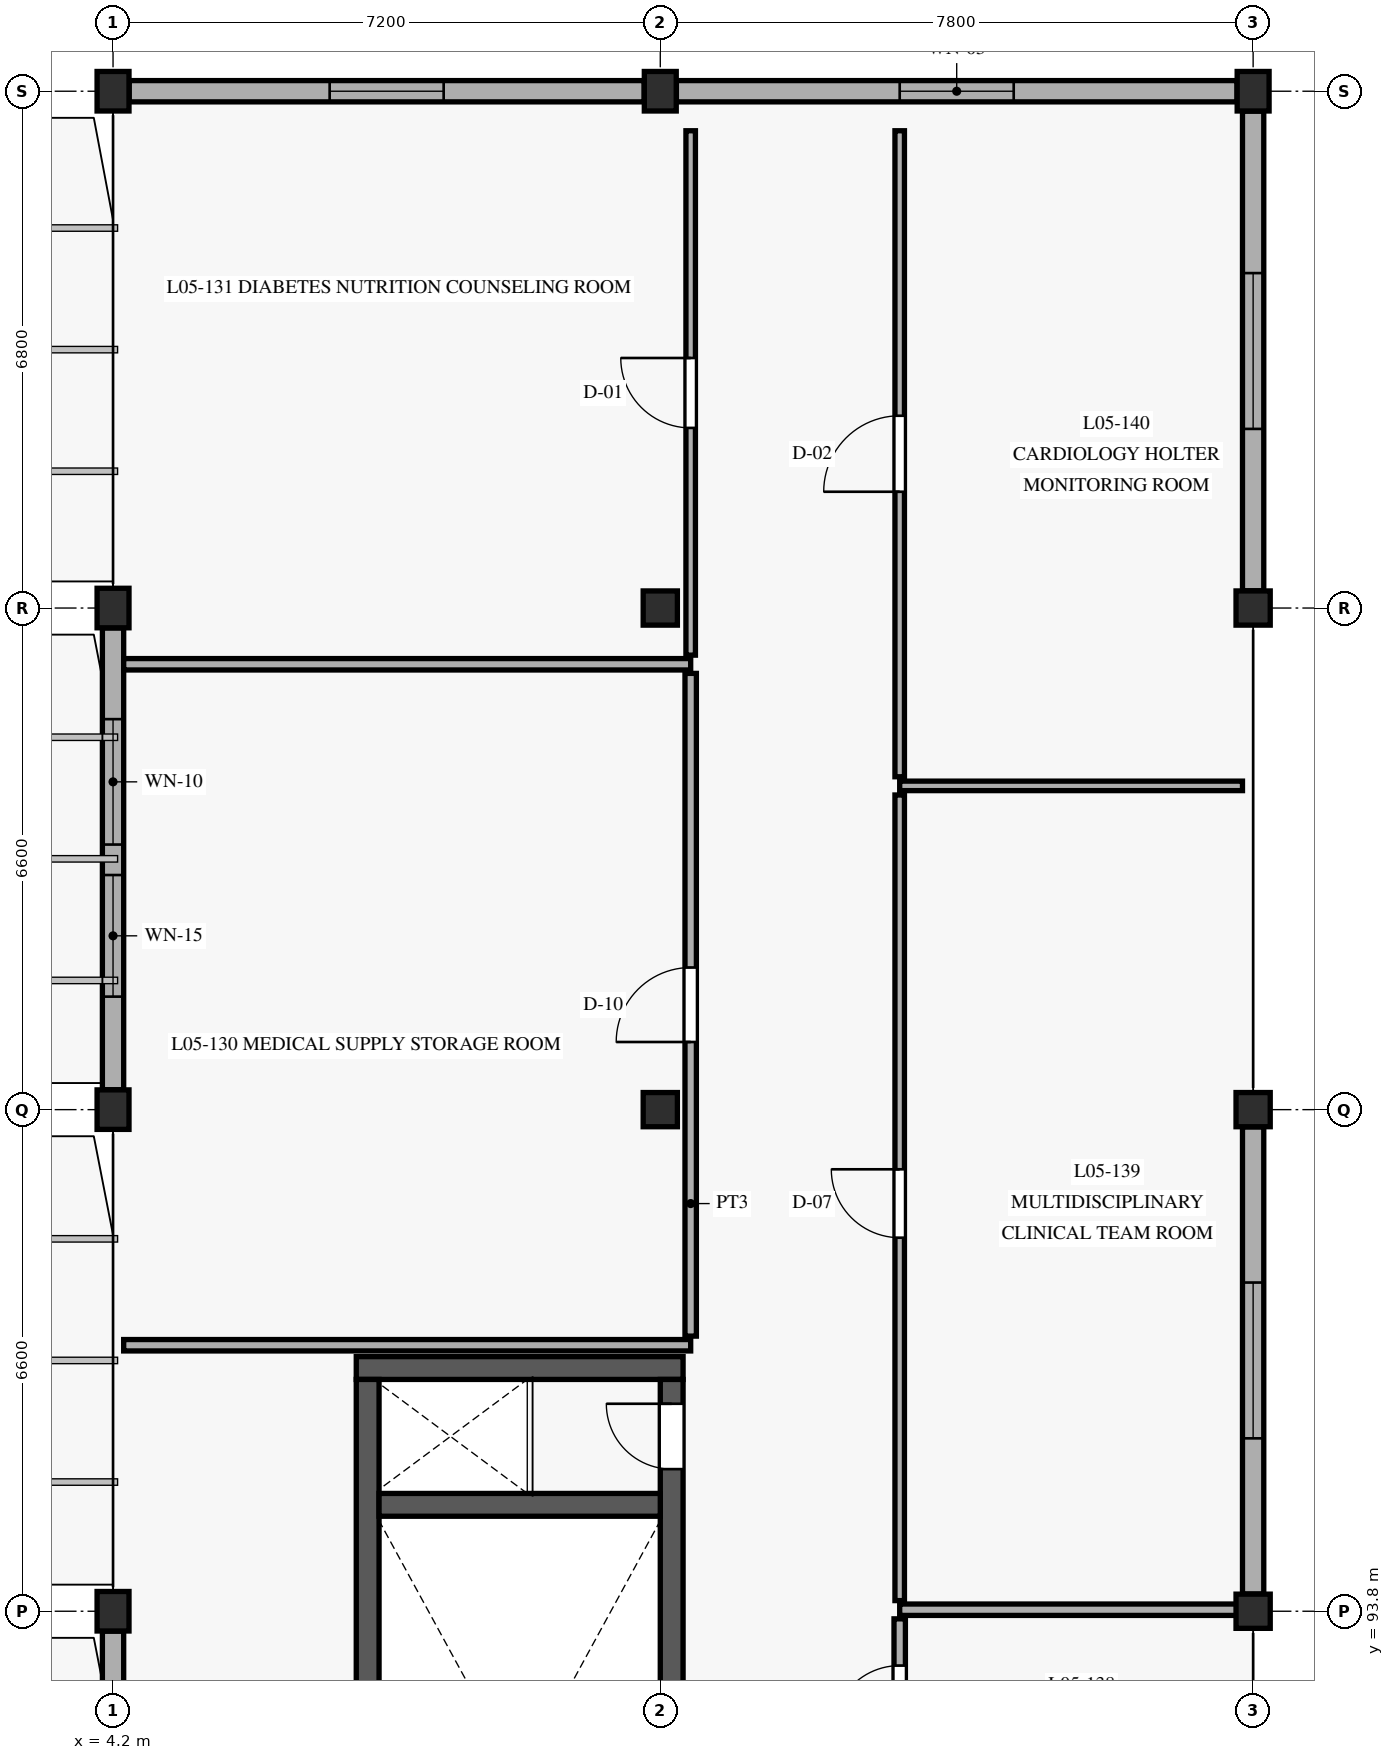
"""IFC4 building model, lengths in metres.
Left out: names, types, materials, properties, quantities, classifications, styles, units other than length and angle.
Written with IfcOpenShell. Run it as: python <this file> out.ifc"""

import sys

from ifc_helpers import new_model, si_unit, direction, frame, frame_2d, origin, origin_with_axes, origin_2d, place, context, subcontext, project, spatial, rectangle, extrude, element, fill, save


model = new_model("IFC4")
c1 = context("Model", 3, precision=1e-05, world=origin(), true_north=direction((0.0, 1.0)))
c2 = subcontext(c1, "Body", "Model", "MODEL_VIEW")
j1 = project(units=[si_unit("LENGTHUNIT", "METRE"), si_unit("PLANEANGLEUNIT", "RADIAN")], contexts=[c1])
p1 = place(None, origin())
s1 = spatial("IfcSite", under=j1, at=p1, CompositionType="ELEMENT")
p2 = place(p1, origin())
s2 = spatial("IfcBuilding", under=s1, at=p2, CompositionType="ELEMENT")
p3 = place(p2, frame((0.0, 0.0, 17.55)))
s3 = spatial("IfcBuildingStorey", under=s2, at=p3, CompositionType="ELEMENT", Elevation=17.55)
for number, where, z_axis, x_axis in (
    (1, (4.2, 93.8, 0.0), (0.0, 0.0, 1.0), (1.0, 0.0, 0.0)),
    (2, (4.2, 100.4, 0.0), (0.0, 0.0, 1.0), (1.0, 0.0, 0.0)),
    (3, (4.2, 107.0, 0.0), (0.0, 0.0, 1.0), (1.0, 0.0, 0.0)),
    (4, (4.2, 113.8, 0.0), (0.0, 0.0, 1.0), (1.0, 0.0, 0.0)),
):
    element("IfcColumn", number, at=place(p3, frame(where, z_axis=z_axis, x_axis=x_axis)), inside=s3, PredefinedType="COLUMN", context=c2, shape_type="SweptSolid", body=[
        extrude(rectangle(XDim=0.42, YDim=0.52, at=origin_2d()), origin(), (0.0, 0.0, 1.0), 4.05),
    ])
for number, where, z_axis, x_axis in (
    (5, (11.4, 100.4, 0.0), (0.0, 0.0, 1.0), (1.0, 0.0, 0.0)),
    (6, (11.4, 107.0, 0.0), (0.0, 0.0, 1.0), (1.0, 0.0, 0.0)),
):
    element("IfcColumn", number, at=place(p3, frame(where, z_axis=z_axis, x_axis=x_axis)), inside=s3, PredefinedType="COLUMN", context=c2, shape_type="SweptSolid", body=[
        extrude(rectangle(XDim=0.45, YDim=0.45, at=origin_2d()), origin(), (0.0, 0.0, 1.0), 4.05),
    ])
p4 = place(p3, frame((11.4, 113.8, 0.0), z_axis=(0.0, 0.0, 1.0), x_axis=(1.0, 0.0, 0.0)))
e7 = element("IfcColumn", 7, at=p4, inside=s3, PredefinedType="COLUMN", context=c2, shape_type="SweptSolid", body=[
    extrude(rectangle(XDim=0.42, YDim=0.52, at=origin_2d()), origin(), (0.0, 0.0, 1.0), 4.05),
])
for number, where, z_axis, x_axis in (
    (8, (19.2, 93.8, 0.0), (0.0, 0.0, 1.0), (1.0, 0.0, 0.0)),
    (9, (19.2, 100.4, 0.0), (0.0, 0.0, 1.0), (1.0, 0.0, 0.0)),
    (10, (19.2, 107.0, 0.0), (0.0, 0.0, 1.0), (1.0, 0.0, 0.0)),
):
    element("IfcColumn", number, at=place(p3, frame(where, z_axis=z_axis, x_axis=x_axis)), inside=s3, PredefinedType="COLUMN", context=c2, shape_type="SweptSolid", body=[
        extrude(rectangle(XDim=0.45, YDim=0.45, at=origin_2d()), origin(), (0.0, 0.0, 1.0), 4.05),
    ])
p5 = place(p3, frame((19.2, 113.8, 0.0), z_axis=(0.0, 0.0, 1.0), x_axis=(1.0, 0.0, 0.0)))
e11 = element("IfcColumn", 11, at=p5, inside=s3, PredefinedType="COLUMN", context=c2, shape_type="SweptSolid", body=[
    extrude(rectangle(XDim=0.42, YDim=0.52, at=origin_2d()), origin(), (0.0, 0.0, 1.0), 4.05),
])
p6 = place(p3, frame((11.7, 97.0, 0.0), z_axis=(0.0, 0.0, 1.0), x_axis=(-1.0, 0.0, 0.0)))
e12 = element("IfcWall", 12, at=p6, inside=s3, PredefinedType="SHEAR", context=c2, shape_type="SweptSolid", body=[
    extrude(rectangle(XDim=4.3, YDim=0.3, at=frame_2d((2.15, 0.0))), origin(), (0.0, 0.0, 1.0), 3.77),
])
p7 = place(p3, frame((7.55, 96.85, 0.0), z_axis=(0.0, 0.0, 1.0), x_axis=(0.0, -1.0, 0.0)))
e13 = element("IfcWall", 13, at=p7, inside=s3, PredefinedType="SHEAR", context=c2, shape_type="SweptSolid", body=[
    extrude(rectangle(XDim=8.7, YDim=0.3, at=frame_2d((4.35, 0.0))), origin(), (0.0, 0.0, 1.0), 3.77),
])
p8 = place(p3, frame((11.55, 88.15, 0.0), z_axis=(0.0, 0.0, 1.0), x_axis=(0.0, 1.0, 0.0)))
e14 = element("IfcWall", 14, at=p8, inside=s3, PredefinedType="SHEAR", context=c2, shape_type="SweptSolid", body=[
    extrude(rectangle(XDim=8.7, YDim=0.3, at=frame_2d((4.35, 0.0))), origin(), (0.0, 0.0, 1.0), 3.77),
])
p9 = place(p8, frame((0.2, 0.0, 0.0)))
e15 = element("IfcOpeningElement", 15, at=p9, cuts=e14, PredefinedType="OPENING", context=c2, shape_type="SweptSolid", body=[
    extrude(rectangle(XDim=1.1, YDim=2.2, at=frame_2d((0.55, 1.1))), frame((0.0, 0.16, 0.0), z_axis=(0.0, -1.0, 0.0), x_axis=(1.0, 0.0, 0.0)), (0.0, 0.0, 1.0), 0.32),
])
p10 = place(p8, frame((7.52, 0.0, 0.0)))
e16 = element("IfcOpeningElement", 16, at=p10, cuts=e14, PredefinedType="OPENING", context=c2, shape_type="SweptSolid", body=[
    extrude(rectangle(XDim=0.86, YDim=2.05, at=frame_2d((0.43, 1.025))), frame((0.0, 0.16, 0.0), z_axis=(0.0, -1.0, 0.0), x_axis=(1.0, 0.0, 0.0)), (0.0, 0.0, 1.0), 0.32),
])
p11 = place(p3, frame((7.7, 95.2, 0.0), z_axis=(0.0, 0.0, 1.0), x_axis=(1.0, 0.0, 0.0)))
e17 = element("IfcWall", 17, at=p11, inside=s3, PredefinedType="SHEAR", context=c2, shape_type="SweptSolid", body=[
    extrude(rectangle(XDim=3.7, YDim=0.3, at=frame_2d((1.85, 0.0))), origin(), (0.0, 0.0, 1.0), 3.77),
])
p12 = place(p3, frame((4.2, 93.538, 0.0), z_axis=(0.0, 0.0, 1.0), x_axis=(0.0, -1.0, 0.0)))
e18 = element("IfcWall", 18, at=p12, inside=s3, PredefinedType="SOLIDWALL", context=c2, shape_type="SweptSolid", body=[
    extrude(rectangle(XDim=6.076, YDim=0.28, at=frame_2d((3.038, 0.0))), origin(), (0.0, 0.0, 1.0), 3.35),
])
p13 = place(p12, frame((1.275, 0.0, 0.88)))
e19 = element("IfcOpeningElement", 19, at=p13, cuts=e18, PredefinedType="OPENING", context=c2, shape_type="SweptSolid", body=[
    extrude(rectangle(XDim=1.5, YDim=1.85, at=frame_2d((0.75, 0.925))), frame((0.0, 0.15, 0.0), z_axis=(0.0, -1.0, 0.0), x_axis=(1.0, 0.0, 0.0)), (0.0, 0.0, 1.0), 0.3),
])
p14 = place(p12, frame((3.351, 0.0, 0.88)))
e20 = element("IfcOpeningElement", 20, at=p14, cuts=e18, PredefinedType="OPENING", context=c2, shape_type="SweptSolid", body=[
    extrude(rectangle(XDim=1.4, YDim=2.05, at=frame_2d((0.7, 1.025))), frame((0.0, 0.15, 0.0), z_axis=(0.0, -1.0, 0.0), x_axis=(1.0, 0.0, 0.0)), (0.0, 0.0, 1.0), 0.3),
])
p15 = place(p3, frame((4.2, 106.738, 0.0), z_axis=(0.0, 0.0, 1.0), x_axis=(0.0, -1.0, 0.0)))
e21 = element("IfcWall", 21, at=p15, inside=s3, PredefinedType="SOLIDWALL", context=c2, shape_type="SweptSolid", body=[
    extrude(rectangle(XDim=6.076, YDim=0.28, at=frame_2d((3.038, 0.0))), origin(), (0.0, 0.0, 1.0), 3.35),
])
p16 = place(p15, frame((1.2, 0.0, 0.88)))
e22 = element("IfcOpeningElement", 22, at=p16, cuts=e21, PredefinedType="OPENING", context=c2, shape_type="SweptSolid", body=[
    extrude(rectangle(XDim=1.65, YDim=1.85, at=frame_2d((0.825, 0.925))), frame((0.0, 0.15, 0.0), z_axis=(0.0, -1.0, 0.0), x_axis=(1.0, 0.0, 0.0)), (0.0, 0.0, 1.0), 0.3),
])
p17 = place(p15, frame((3.251, 0.0, 0.88)))
e23 = element("IfcOpeningElement", 23, at=p17, cuts=e21, PredefinedType="OPENING", context=c2, shape_type="SweptSolid", body=[
    extrude(rectangle(XDim=1.6, YDim=2.05, at=frame_2d((0.8, 1.025))), frame((0.0, 0.15, 0.0), z_axis=(0.0, -1.0, 0.0), x_axis=(1.0, 0.0, 0.0)), (0.0, 0.0, 1.0), 0.3),
])
p18 = place(p3, frame((19.2, 94.027, 0.0), z_axis=(0.0, 0.0, 1.0), x_axis=(0.0, 1.0, 0.0)))
e24 = element("IfcWall", 24, at=p18, inside=s3, PredefinedType="SOLIDWALL", context=c2, shape_type="SweptSolid", body=[
    extrude(rectangle(XDim=6.146, YDim=0.28, at=frame_2d((3.073, 0.0))), origin(), (0.0, 0.0, 1.0), 3.39),
])
p19 = place(p18, frame((2.048, 0.0, 0.8)))
e25 = element("IfcOpeningElement", 25, at=p19, cuts=e24, PredefinedType="OPENING", context=c2, shape_type="SweptSolid", body=[
    extrude(rectangle(XDim=2.05, YDim=1.95, at=frame_2d((1.025, 0.975))), frame((0.0, 0.15, 0.0), z_axis=(0.0, -1.0, 0.0), x_axis=(1.0, 0.0, 0.0)), (0.0, 0.0, 1.0), 0.3),
])
p20 = place(p3, frame((19.2, 107.227, 0.0), z_axis=(0.0, 0.0, 1.0), x_axis=(0.0, 1.0, 0.0)))
e26 = element("IfcWall", 26, at=p20, inside=s3, PredefinedType="SOLIDWALL", context=c2, shape_type="SweptSolid", body=[
    extrude(rectangle(XDim=6.311, YDim=0.28, at=frame_2d((3.156, 0.0))), origin(), (0.0, 0.0, 1.0), 3.39),
])
p21 = place(p20, frame((2.13, 0.0, 0.8)))
e27 = element("IfcOpeningElement", 27, at=p21, cuts=e26, PredefinedType="OPENING", context=c2, shape_type="SweptSolid", body=[
    extrude(rectangle(XDim=2.05, YDim=1.95, at=frame_2d((1.025, 0.975))), frame((0.0, 0.15, 0.0), z_axis=(0.0, -1.0, 0.0), x_axis=(1.0, 0.0, 0.0)), (0.0, 0.0, 1.0), 0.3),
])
p22 = place(p3, frame((18.988, 113.8, 0.0), z_axis=(0.0, 0.0, 1.0), x_axis=(-1.0, 0.0, 0.0)))
e28 = element("IfcWall", 28, at=p22, inside=s3, PredefinedType="SOLIDWALL", context=c2, shape_type="SweptSolid", body=[
    extrude(rectangle(XDim=7.376, YDim=0.28, at=frame_2d((3.688, 0.0))), origin(), (0.0, 0.0, 1.0), 3.27),
])
p23 = place(p22, frame((2.938, 0.0, 0.85)))
e29 = element("IfcOpeningElement", 29, at=p23, cuts=e28, PredefinedType="OPENING", context=c2, shape_type="SweptSolid", body=[
    extrude(rectangle(XDim=1.5, YDim=2.2, at=frame_2d((0.75, 1.1))), frame((0.0, 0.15, 0.0), z_axis=(0.0, -1.0, 0.0), x_axis=(1.0, 0.0, 0.0)), (0.0, 0.0, 1.0), 0.3),
])
p24 = place(p3, frame((11.188, 113.8, 0.0), z_axis=(0.0, 0.0, 1.0), x_axis=(-1.0, 0.0, 0.0)))
e30 = element("IfcWall", 30, at=p24, inside=s3, PredefinedType="SOLIDWALL", context=c2, shape_type="SweptSolid", body=[
    extrude(rectangle(XDim=6.776, YDim=0.28, at=frame_2d((3.388, 0.0))), origin(), (0.0, 0.0, 1.0), 3.27),
])
p25 = place(p24, frame((2.638, 0.0, 0.85)))
e31 = element("IfcOpeningElement", 31, at=p25, cuts=e30, PredefinedType="OPENING", context=c2, shape_type="SweptSolid", body=[
    extrude(rectangle(XDim=1.5, YDim=2.2, at=frame_2d((0.75, 1.1))), frame((0.0, 0.15, 0.0), z_axis=(0.0, -1.0, 0.0), x_axis=(1.0, 0.0, 0.0)), (0.0, 0.0, 1.0), 0.3),
])
p26 = place(p3, frame((11.8, 97.42, 0.0), z_axis=(0.0, 0.0, 1.0), x_axis=(0.0, 1.0, 0.0)))
e32 = element("IfcWall", 32, at=p26, inside=s3, PredefinedType="PARTITIONING", context=c2, shape_type="SweptSolid", body=[
    extrude(rectangle(XDim=8.72, YDim=0.15, at=frame_2d((4.36, 0.0))), origin(), (0.0, 0.0, 1.0), 3.365),
])
p27 = place(p26, frame((3.87, 0.0, 0.0)))
e33 = element("IfcOpeningElement", 33, at=p27, cuts=e32, PredefinedType="OPENING", context=c2, shape_type="SweptSolid", body=[
    extrude(rectangle(XDim=0.98, YDim=2.12, at=frame_2d((0.49, 1.06))), frame((0.0, 0.085, 0.0), z_axis=(0.0, -1.0, 0.0), x_axis=(1.0, 0.0, 0.0)), (0.0, 0.0, 1.0), 0.17),
])
for number, where, z_axis, x_axis in (
    (34, (4.34, 106.26, 0.0), (0.0, 0.0, 1.0), (1.0, 0.0, 0.0)),
    (35, (4.34, 97.3, 0.0), (0.0, 0.0, 1.0), (1.0, 0.0, 0.0)),
):
    element("IfcWall", number, at=place(p3, frame(where, z_axis=z_axis, x_axis=x_axis)), inside=s3, PredefinedType="PARTITIONING", context=c2, shape_type="SweptSolid", body=[
        extrude(rectangle(XDim=7.46, YDim=0.15, at=frame_2d((3.73, 0.0))), origin(), (0.0, 0.0, 1.0), 3.345),
    ])
p28 = place(p3, frame((11.8, 106.38, 0.0), z_axis=(0.0, 0.0, 1.0), x_axis=(0.0, 1.0, 0.0)))
e36 = element("IfcWall", 36, at=p28, inside=s3, PredefinedType="PARTITIONING", context=c2, shape_type="SweptSolid", body=[
    extrude(rectangle(XDim=6.9, YDim=0.125, at=frame_2d((3.45, 0.0))), origin(), (0.0, 0.0, 1.0), 3.365),
])
p29 = place(p28, frame((2.99, 0.0, 0.0)))
e37 = element("IfcOpeningElement", 37, at=p29, cuts=e36, PredefinedType="OPENING", context=c2, shape_type="SweptSolid", body=[
    extrude(rectangle(XDim=0.92, YDim=2.15, at=frame_2d((0.46, 1.075))), frame((0.0, 0.073, 0.0), z_axis=(0.0, -1.0, 0.0), x_axis=(1.0, 0.0, 0.0)), (0.0, 0.0, 1.0), 0.145),
])
p30 = place(p3, frame((14.55, 91.59, 0.0), z_axis=(0.0, 0.0, 1.0), x_axis=(0.0, 1.0, 0.0)))
e38 = element("IfcWall", 38, at=p30, inside=s3, PredefinedType="PARTITIONING", context=c2, shape_type="SweptSolid", body=[
    extrude(rectangle(XDim=2.11, YDim=0.15, at=frame_2d((1.055, 0.0))), origin(), (0.0, 0.0, 1.0), 3.365),
])
p31 = place(p30, frame((0.615, 0.0, 0.0)))
e39 = element("IfcOpeningElement", 39, at=p31, cuts=e38, PredefinedType="OPENING", context=c2, shape_type="SweptSolid", body=[
    extrude(rectangle(XDim=0.88, YDim=2.1, at=frame_2d((0.44, 1.05))), frame((0.0, 0.085, 0.0), z_axis=(0.0, -1.0, 0.0), x_axis=(1.0, 0.0, 0.0)), (0.0, 0.0, 1.0), 0.17),
])
p32 = place(p3, frame((14.55, 93.82, 0.0), z_axis=(0.0, 0.0, 1.0), x_axis=(1.0, 0.0, 0.0)))
e40 = element("IfcWall", 40, at=p32, inside=s3, PredefinedType="PARTITIONING", context=c2, shape_type="SweptSolid", body=[
    extrude(rectangle(XDim=4.51, YDim=0.15, at=frame_2d((2.255, 0.0))), origin(), (0.0, 0.0, 1.0), 3.365),
])
p33 = place(p3, frame((14.55, 93.94, 0.0), z_axis=(0.0, 0.0, 1.0), x_axis=(0.0, 1.0, 0.0)))
e41 = element("IfcWall", 41, at=p33, inside=s3, PredefinedType="PARTITIONING", context=c2, shape_type="SweptSolid", body=[
    extrude(rectangle(XDim=10.6, YDim=0.125, at=frame_2d((5.3, 0.0))), origin(), (0.0, 0.0, 1.0), 3.365),
])
p34 = place(p33, frame((4.775, 0.0, 0.0)))
e42 = element("IfcOpeningElement", 42, at=p34, cuts=e41, PredefinedType="OPENING", context=c2, shape_type="SweptSolid", body=[
    extrude(rectangle(XDim=0.9, YDim=2.12, at=frame_2d((0.45, 1.06))), frame((0.0, 0.073, 0.0), z_axis=(0.0, -1.0, 0.0), x_axis=(1.0, 0.0, 0.0)), (0.0, 0.0, 1.0), 0.145),
])
p35 = place(p3, frame((14.55, 104.66, 0.0), z_axis=(0.0, 0.0, 1.0), x_axis=(1.0, 0.0, 0.0)))
e43 = element("IfcWall", 43, at=p35, inside=s3, PredefinedType="PARTITIONING", context=c2, shape_type="SweptSolid", body=[
    extrude(rectangle(XDim=4.51, YDim=0.125, at=frame_2d((2.255, 0.0))), origin(), (0.0, 0.0, 1.0), 3.385),
])
p36 = place(p3, frame((14.55, 104.78, 0.0), z_axis=(0.0, 0.0, 1.0), x_axis=(0.0, 1.0, 0.0)))
e44 = element("IfcWall", 44, at=p36, inside=s3, PredefinedType="PARTITIONING", context=c2, shape_type="SweptSolid", body=[
    extrude(rectangle(XDim=8.5, YDim=0.125, at=frame_2d((4.25, 0.0))), origin(), (0.0, 0.0, 1.0), 3.365),
])
p37 = place(p36, frame((3.75, 0.0, 0.0)))
e45 = element("IfcOpeningElement", 45, at=p37, cuts=e44, PredefinedType="OPENING", context=c2, shape_type="SweptSolid", body=[
    extrude(rectangle(XDim=1.0, YDim=2.15, at=frame_2d((0.5, 1.075))), frame((0.0, 0.073, 0.0), z_axis=(0.0, -1.0, 0.0), x_axis=(1.0, 0.0, 0.0)), (0.0, 0.0, 1.0), 0.145),
])
p38 = place(p10, origin_with_axes())
e46 = element("IfcDoor", 46, at=p38, inside=s3, OperationType="SINGLE_SWING_RIGHT", PredefinedType="DOOR", context=c2, shape_type="SweptSolid", body=[
    extrude(rectangle(XDim=0.86, YDim=2.05, at=frame_2d((0.43, 1.025))), frame((0.0, 0.025, 0.0), z_axis=(0.0, -1.0, 0.0), x_axis=(1.0, 0.0, 0.0)), (0.0, 0.0, 1.0), 0.05),
])
fill(e16, e46)
p39 = place(p16, origin_with_axes())
e47 = element("IfcWindow", 47, at=p39, inside=s3, PartitioningType="SINGLE_PANEL", PredefinedType="WINDOW", context=c2, shape_type="SweptSolid", body=[
    extrude(rectangle(XDim=1.65, YDim=1.85, at=frame_2d((0.825, 0.925))), frame((0.0, 0.03, 0.0), z_axis=(0.0, -1.0, 0.0), x_axis=(1.0, 0.0, 0.0)), (0.0, 0.0, 1.0), 0.06),
])
fill(e22, e47)
p40 = place(p17, origin_with_axes())
e48 = element("IfcWindow", 48, at=p40, inside=s3, PartitioningType="SINGLE_PANEL", PredefinedType="WINDOW", context=c2, shape_type="SweptSolid", body=[
    extrude(rectangle(XDim=1.6, YDim=2.05, at=frame_2d((0.8, 1.025))), frame((0.0, 0.03, 0.0), z_axis=(0.0, -1.0, 0.0), x_axis=(1.0, 0.0, 0.0)), (0.0, 0.0, 1.0), 0.06),
])
fill(e23, e48)
p41 = place(p19, origin_with_axes())
e49 = element("IfcWindow", 49, at=p41, inside=s3, PartitioningType="SINGLE_PANEL", PredefinedType="WINDOW", context=c2, shape_type="SweptSolid", body=[
    extrude(rectangle(XDim=2.05, YDim=1.95, at=frame_2d((1.025, 0.975))), frame((0.0, 0.03, 0.0), z_axis=(0.0, -1.0, 0.0), x_axis=(1.0, 0.0, 0.0)), (0.0, 0.0, 1.0), 0.06),
])
fill(e25, e49)
p42 = place(p21, origin_with_axes())
e50 = element("IfcWindow", 50, at=p42, inside=s3, PartitioningType="SINGLE_PANEL", PredefinedType="WINDOW", context=c2, shape_type="SweptSolid", body=[
    extrude(rectangle(XDim=2.05, YDim=1.95, at=frame_2d((1.025, 0.975))), frame((0.0, 0.03, 0.0), z_axis=(0.0, -1.0, 0.0), x_axis=(1.0, 0.0, 0.0)), (0.0, 0.0, 1.0), 0.06),
])
fill(e27, e50)
p43 = place(p23, origin_with_axes())
e51 = element("IfcWindow", 51, at=p43, inside=s3, PartitioningType="SINGLE_PANEL", PredefinedType="WINDOW", context=c2, shape_type="SweptSolid", body=[
    extrude(rectangle(XDim=1.5, YDim=2.2, at=frame_2d((0.75, 1.1))), frame((0.0, 0.03, 0.0), z_axis=(0.0, -1.0, 0.0), x_axis=(1.0, 0.0, 0.0)), (0.0, 0.0, 1.0), 0.06),
])
fill(e29, e51)
p44 = place(p25, origin_with_axes())
e52 = element("IfcWindow", 52, at=p44, inside=s3, PartitioningType="SINGLE_PANEL", PredefinedType="WINDOW", context=c2, shape_type="SweptSolid", body=[
    extrude(rectangle(XDim=1.5, YDim=2.2, at=frame_2d((0.75, 1.1))), frame((0.0, 0.03, 0.0), z_axis=(0.0, -1.0, 0.0), x_axis=(1.0, 0.0, 0.0)), (0.0, 0.0, 1.0), 0.06),
])
fill(e31, e52)
p45 = place(p27, origin_with_axes())
e53 = element("IfcDoor", 53, at=p45, inside=s3, OperationType="SINGLE_SWING_LEFT", PredefinedType="DOOR", context=c2, shape_type="SweptSolid", body=[
    extrude(rectangle(XDim=0.98, YDim=2.12, at=frame_2d((0.49, 1.06))), frame((0.0, 0.025, 0.0), z_axis=(0.0, -1.0, 0.0), x_axis=(1.0, 0.0, 0.0)), (0.0, 0.0, 1.0), 0.05),
])
fill(e33, e53)
p46 = place(p29, origin_with_axes())
e54 = element("IfcDoor", 54, at=p46, inside=s3, OperationType="SINGLE_SWING_RIGHT", PredefinedType="DOOR", context=c2, shape_type="SweptSolid", body=[
    extrude(rectangle(XDim=0.92, YDim=2.15, at=frame_2d((0.46, 1.075))), frame((0.0, 0.025, 0.0), z_axis=(0.0, -1.0, 0.0), x_axis=(1.0, 0.0, 0.0)), (0.0, 0.0, 1.0), 0.05),
])
fill(e37, e54)
p47 = place(p31, frame((0.88, 0.0, 0.0), z_axis=(0.0, 0.0, 1.0), x_axis=(-1.0, 0.0, 0.0)))
e55 = element("IfcDoor", 55, at=p47, inside=s3, OperationType="SINGLE_SWING_RIGHT", PredefinedType="DOOR", context=c2, shape_type="SweptSolid", body=[
    extrude(rectangle(XDim=0.88, YDim=2.1, at=frame_2d((0.44, 1.05))), frame((0.0, 0.025, 0.0), z_axis=(0.0, -1.0, 0.0), x_axis=(1.0, 0.0, 0.0)), (0.0, 0.0, 1.0), 0.05),
])
fill(e39, e55)
p48 = place(p34, frame((0.9, 0.0, 0.0), z_axis=(0.0, 0.0, 1.0), x_axis=(-1.0, 0.0, 0.0)))
e56 = element("IfcDoor", 56, at=p48, inside=s3, OperationType="SINGLE_SWING_LEFT", PredefinedType="DOOR", context=c2, shape_type="SweptSolid", body=[
    extrude(rectangle(XDim=0.9, YDim=2.12, at=frame_2d((0.45, 1.06))), frame((0.0, 0.025, 0.0), z_axis=(0.0, -1.0, 0.0), x_axis=(1.0, 0.0, 0.0)), (0.0, 0.0, 1.0), 0.05),
])
fill(e42, e56)
p49 = place(p37, frame((1.0, 0.0, 0.0), z_axis=(0.0, 0.0, 1.0), x_axis=(-1.0, 0.0, 0.0)))
e57 = element("IfcDoor", 57, at=p49, inside=s3, OperationType="SINGLE_SWING_RIGHT", PredefinedType="DOOR", context=c2, shape_type="SweptSolid", body=[
    extrude(rectangle(XDim=1.0, YDim=2.15, at=frame_2d((0.5, 1.075))), frame((0.0, 0.025, 0.0), z_axis=(0.0, -1.0, 0.0), x_axis=(1.0, 0.0, 0.0)), (0.0, 0.0, 1.0), 0.05),
])
fill(e45, e57)
save(model, sys.argv[1])
